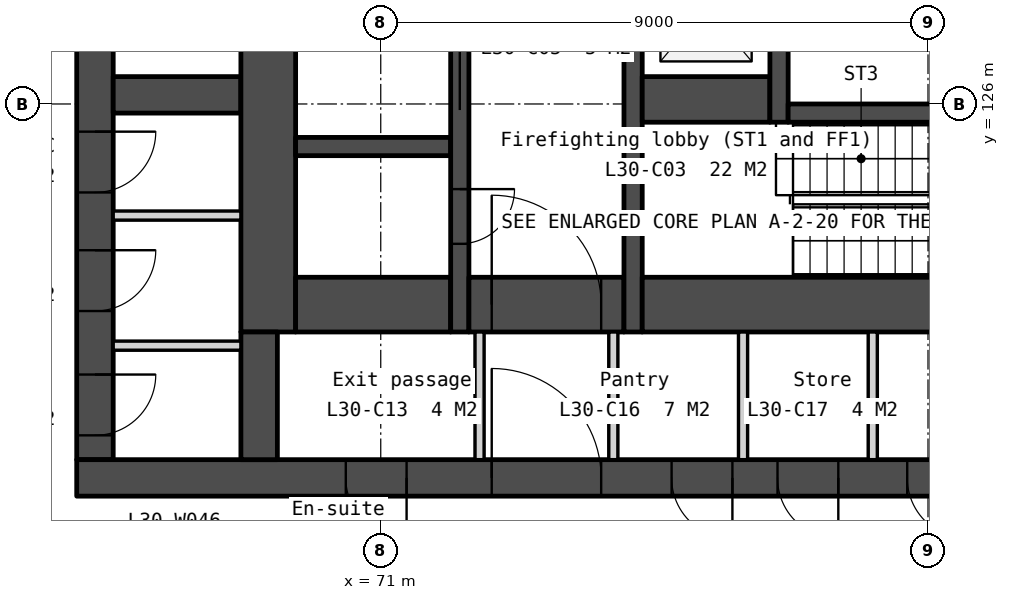
"""IFC4 building model, lengths in metres.
Left out: names, types, materials, properties, quantities, classifications, styles, units other than length and angle.
Written with IfcOpenShell. Run it as: python <this file> out.ifc"""

import sys

from ifc_helpers import new_model, si_unit, direction, frame, frame_2d, origin, place, context, subcontext, project, spatial, polyline, rectangle, outline, extrude, element, fill, save


model = new_model("IFC4")
c1 = context("Model", 3, precision=1e-05, world=origin(), true_north=direction((0.0, 1.0)))
c2 = subcontext(c1, "Body", "Model", "MODEL_VIEW")
j1 = project(units=[si_unit("LENGTHUNIT", "METRE"), si_unit("PLANEANGLEUNIT", "RADIAN")], contexts=[c1])
p1 = place(None, origin())
s1 = spatial("IfcSite", under=j1, at=p1, CompositionType="ELEMENT")
p2 = place(p1, origin())
s2 = spatial("IfcBuilding", under=s1, at=p2, CompositionType="ELEMENT")
p3 = place(p2, frame((0.0, 0.0, 120.3)))
s3 = spatial("IfcBuildingStorey", under=s2, at=p3, CompositionType="ELEMENT", Elevation=120.3)
p4 = place(p3, frame((66.3, 133.95, 0.0), z_axis=(0.0, 0.0, 1.0), x_axis=(0.0, -1.0, 0.0)))
e1 = element("IfcWall", 1, at=p4, inside=s3, PredefinedType="SOLIDWALL", context=c2, shape_type="SweptSolid", body=[
    extrude(rectangle(XDim=13.8, YDim=0.6, at=frame_2d((6.9, 0.0))), origin(), (0.0, 0.0, 1.0), 3.25),
])
p5 = place(p4, frame((0.6, 0.0, 0.0)))
e2 = element("IfcOpeningElement", 2, at=p5, cuts=e1, PredefinedType="OPENING", context=c2, shape_type="SweptSolid", body=[
    extrude(rectangle(XDim=1.1, YDim=2.1, at=frame_2d((0.55, 1.05))), frame((0.0, 0.31, 0.0), z_axis=(0.0, -1.0, 0.0), x_axis=(1.0, 0.0, 0.0)), (0.0, 0.0, 1.0), 0.62),
])
p6 = place(p4, frame((8.405, 0.0, 0.0)))
e3 = element("IfcOpeningElement", 3, at=p6, cuts=e1, PredefinedType="OPENING", context=c2, shape_type="SweptSolid", body=[
    extrude(rectangle(XDim=1.0, YDim=2.1, at=frame_2d((0.5, 1.05))), frame((0.0, 0.31, 0.0), z_axis=(0.0, -1.0, 0.0), x_axis=(1.0, 0.0, 0.0)), (0.0, 0.0, 1.0), 0.62),
])
p7 = place(p4, frame((10.355, 0.0, 0.0)))
e4 = element("IfcOpeningElement", 4, at=p7, cuts=e1, PredefinedType="OPENING", context=c2, shape_type="SweptSolid", body=[
    extrude(rectangle(XDim=1.0, YDim=2.1, at=frame_2d((0.5, 1.05))), frame((0.0, 0.31, 0.0), z_axis=(0.0, -1.0, 0.0), x_axis=(1.0, 0.0, 0.0)), (0.0, 0.0, 1.0), 0.62),
])
p8 = place(p4, frame((12.4, 0.0, 0.0)))
e5 = element("IfcOpeningElement", 5, at=p8, cuts=e1, PredefinedType="OPENING", context=c2, shape_type="SweptSolid", body=[
    extrude(rectangle(XDim=1.0, YDim=2.1, at=frame_2d((0.5, 1.05))), frame((0.0, 0.31, 0.0), z_axis=(0.0, -1.0, 0.0), x_axis=(1.0, 0.0, 0.0)), (0.0, 0.0, 1.0), 0.62),
])
p9 = place(p3, frame((66.0, 119.85, 0.0), z_axis=(0.0, 0.0, 1.0), x_axis=(1.0, 0.0, 0.0)))
e6 = element("IfcWall", 6, at=p9, inside=s3, PredefinedType="SOLIDWALL", context=c2, shape_type="SweptSolid", body=[
    extrude(rectangle(XDim=28.0, YDim=0.6, at=frame_2d((14.0, 0.0))), origin(), (0.0, 0.0, 1.0), 3.25),
])
p10 = place(p9, frame((6.825, 0.0, 0.0)))
e7 = element("IfcOpeningElement", 7, at=p10, cuts=e6, PredefinedType="OPENING", context=c2, shape_type="SweptSolid", body=[
    extrude(rectangle(XDim=1.8, YDim=2.1, at=frame_2d((0.9, 1.05))), frame((0.0, 0.31, 0.0), z_axis=(0.0, -1.0, 0.0), x_axis=(1.0, 0.0, 0.0)), (0.0, 0.0, 1.0), 0.62),
])
p11 = place(p9, frame((15.85, 0.0, 0.0)))
e8 = element("IfcOpeningElement", 8, at=p11, cuts=e6, PredefinedType="OPENING", context=c2, shape_type="SweptSolid", body=[
    extrude(rectangle(XDim=1.5, YDim=2.1, at=frame_2d((0.75, 1.05))), frame((0.0, 0.31, 0.0), z_axis=(0.0, -1.0, 0.0), x_axis=(1.0, 0.0, 0.0)), (0.0, 0.0, 1.0), 0.62),
])
p12 = place(p9, frame((19.375, 0.0, 0.0)))
e9 = element("IfcOpeningElement", 9, at=p12, cuts=e6, PredefinedType="OPENING", context=c2, shape_type="SweptSolid", body=[
    extrude(rectangle(XDim=1.8, YDim=2.1, at=frame_2d((0.9, 1.05))), frame((0.0, 0.31, 0.0), z_axis=(0.0, -1.0, 0.0), x_axis=(1.0, 0.0, 0.0)), (0.0, 0.0, 1.0), 0.62),
])
p13 = place(p9, frame((4.425, 0.0, 0.0)))
e10 = element("IfcOpeningElement", 10, at=p13, cuts=e6, PredefinedType="OPENING", context=c2, shape_type="SweptSolid", body=[
    extrude(rectangle(XDim=1.0, YDim=2.1, at=frame_2d((0.5, 1.05))), frame((0.0, 0.31, 0.0), z_axis=(0.0, -1.0, 0.0), x_axis=(1.0, 0.0, 0.0)), (0.0, 0.0, 1.0), 0.62),
])
p14 = place(p9, frame((9.783, 0.0, 0.0)))
e11 = element("IfcOpeningElement", 11, at=p14, cuts=e6, PredefinedType="OPENING", context=c2, shape_type="SweptSolid", body=[
    extrude(rectangle(XDim=1.0, YDim=2.1, at=frame_2d((0.5, 1.05))), frame((0.0, 0.31, 0.0), z_axis=(0.0, -1.0, 0.0), x_axis=(1.0, 0.0, 0.0)), (0.0, 0.0, 1.0), 0.62),
])
p15 = place(p9, frame((11.525, 0.0, 0.0)))
e12 = element("IfcOpeningElement", 12, at=p15, cuts=e6, PredefinedType="OPENING", context=c2, shape_type="SweptSolid", body=[
    extrude(rectangle(XDim=1.0, YDim=2.1, at=frame_2d((0.5, 1.05))), frame((0.0, 0.31, 0.0), z_axis=(0.0, -1.0, 0.0), x_axis=(1.0, 0.0, 0.0)), (0.0, 0.0, 1.0), 0.62),
])
p16 = place(p9, frame((13.658, 0.0, 0.0)))
e13 = element("IfcOpeningElement", 13, at=p16, cuts=e6, PredefinedType="OPENING", context=c2, shape_type="SweptSolid", body=[
    extrude(rectangle(XDim=1.0, YDim=2.1, at=frame_2d((0.5, 1.05))), frame((0.0, 0.31, 0.0), z_axis=(0.0, -1.0, 0.0), x_axis=(1.0, 0.0, 0.0)), (0.0, 0.0, 1.0), 0.62),
])
p17 = place(p9, frame((21.725, 0.0, 0.0)))
e14 = element("IfcOpeningElement", 14, at=p17, cuts=e6, PredefinedType="OPENING", context=c2, shape_type="SweptSolid", body=[
    extrude(rectangle(XDim=1.0, YDim=2.1, at=frame_2d((0.5, 1.05))), frame((0.0, 0.31, 0.0), z_axis=(0.0, -1.0, 0.0), x_axis=(1.0, 0.0, 0.0)), (0.0, 0.0, 1.0), 0.62),
])
p18 = place(p9, frame((23.425, 0.0, 0.0)))
e15 = element("IfcOpeningElement", 15, at=p18, cuts=e6, PredefinedType="OPENING", context=c2, shape_type="SweptSolid", body=[
    extrude(rectangle(XDim=1.0, YDim=2.1, at=frame_2d((0.5, 1.05))), frame((0.0, 0.31, 0.0), z_axis=(0.0, -1.0, 0.0), x_axis=(1.0, 0.0, 0.0)), (0.0, 0.0, 1.0), 0.62),
])
p19 = place(p3, frame((66.6, 126.15, 0.0), z_axis=(0.0, 0.0, 1.0), x_axis=(1.0, 0.0, 0.0)))
e16 = element("IfcWall", 16, at=p19, inside=s3, PredefinedType="SOLIDWALL", context=c2, shape_type="SweptSolid", body=[
    extrude(rectangle(XDim=2.1, YDim=0.6, at=frame_2d((1.05, 0.0))), origin(), (0.0, 0.0, 1.0), 3.25),
])
for number, where, z_axis, x_axis in (
    (17, (66.6, 124.165, 0.0), (0.0, 0.0, 1.0), (1.0, 0.0, 0.0)),
    (18, (66.6, 122.025, 0.0), (0.0, 0.0, 1.0), (1.0, 0.0, 0.0)),
):
    element("IfcWall", number, at=place(p3, frame(where, z_axis=z_axis, x_axis=x_axis)), inside=s3, PredefinedType="PARTITIONING", context=c2, shape_type="SweptSolid", body=[
        extrude(rectangle(XDim=2.1, YDim=0.15, at=frame_2d((1.05, 0.0))), origin(), (0.0, 0.0, 1.0), 3.25),
    ])
p20 = place(p3, frame((69.15, 133.95, 0.0), z_axis=(0.0, 0.0, 1.0), x_axis=(0.0, -1.0, 0.0)))
e19 = element("IfcWall", 19, at=p20, inside=s3, PredefinedType="SOLIDWALL", context=c2, shape_type="SweptSolid", body=[
    extrude(rectangle(XDim=11.7, YDim=0.9, at=frame_2d((5.85, 0.0))), origin(), (0.0, 0.0, 1.0), 3.25),
])
p21 = place(p3, frame((69.0, 122.25, 0.0), z_axis=(0.0, 0.0, 1.0), x_axis=(0.0, -1.0, 0.0)))
e20 = element("IfcWall", 20, at=p21, inside=s3, PredefinedType="SOLIDWALL", context=c2, shape_type="SweptSolid", body=[
    extrude(rectangle(XDim=2.1, YDim=0.6, at=frame_2d((1.05, 0.0))), origin(), (0.0, 0.0, 1.0), 3.25),
])
p22 = place(p3, frame((69.6, 125.3, 0.0), z_axis=(0.0, 0.0, 1.0), x_axis=(1.0, 0.0, 0.0)))
e21 = element("IfcWall", 21, at=p22, inside=s3, PredefinedType="SOLIDWALL", context=c2, shape_type="SweptSolid", body=[
    extrude(rectangle(XDim=2.55, YDim=0.3, at=frame_2d((1.275, 0.0))), origin(), (0.0, 0.0, 1.0), 3.25),
])
p23 = place(p3, frame((69.6, 122.7, 0.0), z_axis=(0.0, 0.0, 1.0), x_axis=(1.0, 0.0, 0.0)))
e22 = element("IfcWall", 22, at=p23, inside=s3, PredefinedType="SOLIDWALL", context=c2, shape_type="SweptSolid", body=[
    extrude(rectangle(XDim=2.55, YDim=0.9, at=frame_2d((1.275, 0.0))), origin(), (0.0, 0.0, 1.0), 3.25),
])
p24 = place(p3, frame((72.3, 133.95, 0.0), z_axis=(0.0, 0.0, 1.0), x_axis=(0.0, -1.0, 0.0)))
e23 = element("IfcWall", 23, at=p24, inside=s3, PredefinedType="SOLIDWALL", context=c2, shape_type="SweptSolid", body=[
    extrude(rectangle(XDim=11.7, YDim=0.3, at=frame_2d((5.85, 0.0))), origin(), (0.0, 0.0, 1.0), 3.25),
])
p25 = place(p24, frame((6.95, 0.0, 0.0)))
e24 = element("IfcOpeningElement", 24, at=p25, cuts=e23, PredefinedType="OPENING", context=c2, shape_type="SweptSolid", body=[
    extrude(rectangle(XDim=1.1, YDim=2.1, at=frame_2d((0.55, 1.05))), frame((0.0, 0.16, 0.0), z_axis=(0.0, -1.0, 0.0), x_axis=(1.0, 0.0, 0.0)), (0.0, 0.0, 1.0), 0.32),
])
p26 = place(p24, frame((9.35, 0.0, 0.0)))
e25 = element("IfcOpeningElement", 25, at=p26, cuts=e23, PredefinedType="OPENING", context=c2, shape_type="SweptSolid", body=[
    extrude(rectangle(XDim=0.9, YDim=2.1, at=frame_2d((0.45, 1.05))), frame((0.0, 0.16, 0.0), z_axis=(0.0, -1.0, 0.0), x_axis=(1.0, 0.0, 0.0)), (0.0, 0.0, 1.0), 0.32),
])
p27 = place(p24, frame((5.1, 0.0, 0.0)))
e26 = element("IfcOpeningElement", 26, at=p27, cuts=e23, PredefinedType="OPENING", context=c2, shape_type="SweptSolid", body=[
    extrude(rectangle(XDim=1.0, YDim=2.1, at=frame_2d((0.5, 1.05))), frame((0.0, 0.16, 0.0), z_axis=(0.0, -1.0, 0.0), x_axis=(1.0, 0.0, 0.0)), (0.0, 0.0, 1.0), 0.32),
])
p28 = place(p3, frame((72.45, 122.7, 0.0), z_axis=(0.0, 0.0, 1.0), x_axis=(1.0, 0.0, 0.0)))
e27 = element("IfcWall", 27, at=p28, inside=s3, PredefinedType="SOLIDWALL", context=c2, shape_type="SweptSolid", body=[
    extrude(rectangle(XDim=2.55, YDim=0.9, at=frame_2d((1.275, 0.0))), origin(), (0.0, 0.0, 1.0), 3.25),
])
p29 = place(p28, frame((0.375, 0.0, 0.0)))
e28 = element("IfcOpeningElement", 28, at=p29, cuts=e27, PredefinedType="OPENING", context=c2, shape_type="SweptSolid", body=[
    extrude(rectangle(XDim=1.8, YDim=2.1, at=frame_2d((0.9, 1.05))), frame((0.0, 0.46, 0.0), z_axis=(0.0, -1.0, 0.0), x_axis=(1.0, 0.0, 0.0)), (0.0, 0.0, 1.0), 0.92),
])
for number, where, z_axis, x_axis in (
    (29, (72.625, 122.25, 0.0), (0.0, 0.0, 1.0), (0.0, -1.0, 0.0)),
    (30, (74.825, 122.25, 0.0), (0.0, 0.0, 1.0), (0.0, -1.0, 0.0)),
):
    element("IfcWall", number, at=place(p3, frame(where, z_axis=z_axis, x_axis=x_axis)), inside=s3, PredefinedType="PARTITIONING", context=c2, shape_type="SweptSolid", body=[
        extrude(rectangle(XDim=2.1, YDim=0.15, at=frame_2d((1.05, 0.0))), origin(), (0.0, 0.0, 1.0), 3.25),
    ])
p30 = place(p3, frame((75.15, 133.95, 0.0), z_axis=(0.0, 0.0, 1.0), x_axis=(0.0, -1.0, 0.0)))
e31 = element("IfcWall", 31, at=p30, inside=s3, PredefinedType="SOLIDWALL", context=c2, shape_type="SweptSolid", body=[
    extrude(rectangle(XDim=11.7, YDim=0.3, at=frame_2d((5.85, 0.0))), origin(), (0.0, 0.0, 1.0), 3.25),
])
p31 = place(p3, frame((75.3, 126.075, 0.0), z_axis=(0.0, 0.0, 1.0), x_axis=(1.0, 0.0, 0.0)))
e32 = element("IfcWall", 32, at=p31, inside=s3, PredefinedType="SOLIDWALL", context=c2, shape_type="SweptSolid", body=[
    extrude(rectangle(XDim=2.1, YDim=0.75, at=frame_2d((1.05, 0.0))), origin(), (0.0, 0.0, 1.0), 3.25),
])
p32 = place(p3, frame((75.3, 122.7, 0.0), z_axis=(0.0, 0.0, 1.0), x_axis=(1.0, 0.0, 0.0)))
e33 = element("IfcWall", 33, at=p32, inside=s3, PredefinedType="SOLIDWALL", context=c2, shape_type="SweptSolid", body=[
    extrude(rectangle(XDim=6.2, YDim=0.9, at=frame_2d((3.1, 0.0))), origin(), (0.0, 0.0, 1.0), 3.25),
])
p33 = place(p3, frame((76.958, 122.25, 0.0), z_axis=(0.0, 0.0, 1.0), x_axis=(0.0, -1.0, 0.0)))
e34 = element("IfcWall", 34, at=p33, inside=s3, PredefinedType="PARTITIONING", context=c2, shape_type="SweptSolid", body=[
    extrude(rectangle(XDim=2.1, YDim=0.15, at=frame_2d((1.05, 0.0))), origin(), (0.0, 0.0, 1.0), 3.25),
])
p34 = place(p3, frame((77.55, 133.95, 0.0), z_axis=(0.0, 0.0, 1.0), x_axis=(0.0, -1.0, 0.0)))
e35 = element("IfcWall", 35, at=p34, inside=s3, PredefinedType="SOLIDWALL", context=c2, shape_type="SweptSolid", body=[
    extrude(rectangle(XDim=8.25, YDim=0.3, at=frame_2d((4.125, 0.0))), origin(), (0.0, 0.0, 1.0), 3.25),
])
p35 = place(p34, frame((0.6, 0.0, 0.0)))
e36 = element("IfcOpeningElement", 36, at=p35, cuts=e35, PredefinedType="OPENING", context=c2, shape_type="SweptSolid", body=[
    extrude(rectangle(XDim=1.1, YDim=2.1, at=frame_2d((0.55, 1.05))), frame((0.0, 0.16, 0.0), z_axis=(0.0, -1.0, 0.0), x_axis=(1.0, 0.0, 0.0)), (0.0, 0.0, 1.0), 0.32),
])
p36 = place(p34, frame((3.2, 0.0, 0.0)))
e37 = element("IfcOpeningElement", 37, at=p36, cuts=e35, PredefinedType="OPENING", context=c2, shape_type="SweptSolid", body=[
    extrude(rectangle(XDim=1.1, YDim=2.1, at=frame_2d((0.55, 1.05))), frame((0.0, 0.16, 0.0), z_axis=(0.0, -1.0, 0.0), x_axis=(1.0, 0.0, 0.0)), (0.0, 0.0, 1.0), 0.32),
])
p37 = place(p34, frame((5.8, 0.0, 0.0)))
e38 = element("IfcOpeningElement", 38, at=p37, cuts=e35, PredefinedType="OPENING", context=c2, shape_type="SweptSolid", body=[
    extrude(rectangle(XDim=1.1, YDim=2.1, at=frame_2d((0.55, 1.05))), frame((0.0, 0.16, 0.0), z_axis=(0.0, -1.0, 0.0), x_axis=(1.0, 0.0, 0.0)), (0.0, 0.0, 1.0), 0.32),
])
p38 = place(p3, frame((77.7, 125.85, 0.0), z_axis=(0.0, 0.0, 1.0), x_axis=(1.0, 0.0, 0.0)))
e39 = element("IfcWall", 39, at=p38, inside=s3, PredefinedType="SOLIDWALL", context=c2, shape_type="SweptSolid", body=[
    extrude(rectangle(XDim=4.6, YDim=0.3, at=frame_2d((2.3, 0.0))), origin(), (0.0, 0.0, 1.0), 3.25),
])
p39 = place(p3, frame((79.092, 122.25, 0.0), z_axis=(0.0, 0.0, 1.0), x_axis=(0.0, -1.0, 0.0)))
e40 = element("IfcWall", 40, at=p39, inside=s3, PredefinedType="PARTITIONING", context=c2, shape_type="SweptSolid", body=[
    extrude(rectangle(XDim=2.1, YDim=0.15, at=frame_2d((1.05, 0.0))), origin(), (0.0, 0.0, 1.0), 3.25),
])
p40 = place(p3, frame((56.073, 130.263, -0.15), z_axis=(0.0, 0.0, 1.0), x_axis=(0.500000478905, -0.866025127289, 0.0)))
e41 = element("IfcWall", 41, at=p40, inside=s3, PredefinedType="SOLIDWALL", context=c2, shape_type="SweptSolid", body=[
    extrude(outline(polyline([(42.643, 0.0), (42.643, 3.4), (0.0, 3.4), (0.0, 0.0), (42.643, 0.0)])), frame((0.0, 0.225, 0.0), z_axis=(0.0, -1.0, 0.0), x_axis=(1.0, 0.0, 0.0)), (0.0, 0.0, 1.0), 0.45),
])
p41 = place(p40, frame((2.814, 0.0, 1.05)))
e42 = element("IfcOpeningElement", 42, at=p41, cuts=e41, PredefinedType="OPENING", context=c2, shape_type="SweptSolid", body=[
    extrude(rectangle(XDim=1.2, YDim=1.5, at=frame_2d((0.6, 0.75))), frame((0.0, 0.235, 0.0), z_axis=(0.0, -1.0, 0.0), x_axis=(1.0, 0.0, 0.0)), (0.0, 0.0, 1.0), 0.47),
])
p42 = place(p40, frame((4.514, 0.0, 1.05)))
e43 = element("IfcOpeningElement", 43, at=p42, cuts=e41, PredefinedType="OPENING", context=c2, shape_type="SweptSolid", body=[
    extrude(rectangle(XDim=1.2, YDim=1.5, at=frame_2d((0.6, 0.75))), frame((0.0, 0.235, 0.0), z_axis=(0.0, -1.0, 0.0), x_axis=(1.0, 0.0, 0.0)), (0.0, 0.0, 1.0), 0.47),
])
p43 = place(p40, frame((11.343, 0.0, 1.05)))
e44 = element("IfcOpeningElement", 44, at=p43, cuts=e41, PredefinedType="OPENING", context=c2, shape_type="SweptSolid", body=[
    extrude(rectangle(XDim=1.2, YDim=1.5, at=frame_2d((0.6, 0.75))), frame((0.0, 0.235, 0.0), z_axis=(0.0, -1.0, 0.0), x_axis=(1.0, 0.0, 0.0)), (0.0, 0.0, 1.0), 0.47),
])
p44 = place(p40, frame((13.043, 0.0, 1.05)))
e45 = element("IfcOpeningElement", 45, at=p44, cuts=e41, PredefinedType="OPENING", context=c2, shape_type="SweptSolid", body=[
    extrude(rectangle(XDim=1.2, YDim=1.5, at=frame_2d((0.6, 0.75))), frame((0.0, 0.235, 0.0), z_axis=(0.0, -1.0, 0.0), x_axis=(1.0, 0.0, 0.0)), (0.0, 0.0, 1.0), 0.47),
])
p45 = place(p40, frame((19.872, 0.0, 1.05)))
e46 = element("IfcOpeningElement", 46, at=p45, cuts=e41, PredefinedType="OPENING", context=c2, shape_type="SweptSolid", body=[
    extrude(rectangle(XDim=1.2, YDim=1.5, at=frame_2d((0.6, 0.75))), frame((0.0, 0.235, 0.0), z_axis=(0.0, -1.0, 0.0), x_axis=(1.0, 0.0, 0.0)), (0.0, 0.0, 1.0), 0.47),
])
p46 = place(p40, frame((21.572, 0.0, 1.05)))
e47 = element("IfcOpeningElement", 47, at=p46, cuts=e41, PredefinedType="OPENING", context=c2, shape_type="SweptSolid", body=[
    extrude(rectangle(XDim=1.2, YDim=1.5, at=frame_2d((0.6, 0.75))), frame((0.0, 0.235, 0.0), z_axis=(0.0, -1.0, 0.0), x_axis=(1.0, 0.0, 0.0)), (0.0, 0.0, 1.0), 0.47),
])
p47 = place(p40, frame((28.4, 0.0, 1.05)))
e48 = element("IfcOpeningElement", 48, at=p47, cuts=e41, PredefinedType="OPENING", context=c2, shape_type="SweptSolid", body=[
    extrude(rectangle(XDim=1.2, YDim=1.5, at=frame_2d((0.6, 0.75))), frame((0.0, 0.235, 0.0), z_axis=(0.0, -1.0, 0.0), x_axis=(1.0, 0.0, 0.0)), (0.0, 0.0, 1.0), 0.47),
])
p48 = place(p40, frame((30.1, 0.0, 1.05)))
e49 = element("IfcOpeningElement", 49, at=p48, cuts=e41, PredefinedType="OPENING", context=c2, shape_type="SweptSolid", body=[
    extrude(rectangle(XDim=1.2, YDim=1.5, at=frame_2d((0.6, 0.75))), frame((0.0, 0.235, 0.0), z_axis=(0.0, -1.0, 0.0), x_axis=(1.0, 0.0, 0.0)), (0.0, 0.0, 1.0), 0.47),
])
p49 = place(p40, frame((36.929, 0.0, 1.05)))
e50 = element("IfcOpeningElement", 50, at=p49, cuts=e41, PredefinedType="OPENING", context=c2, shape_type="SweptSolid", body=[
    extrude(rectangle(XDim=1.2, YDim=1.5, at=frame_2d((0.6, 0.75))), frame((0.0, 0.235, 0.0), z_axis=(0.0, -1.0, 0.0), x_axis=(1.0, 0.0, 0.0)), (0.0, 0.0, 1.0), 0.47),
])
p50 = place(p40, frame((38.629, 0.0, 1.05)))
e51 = element("IfcOpeningElement", 51, at=p50, cuts=e41, PredefinedType="OPENING", context=c2, shape_type="SweptSolid", body=[
    extrude(rectangle(XDim=1.2, YDim=1.5, at=frame_2d((0.6, 0.75))), frame((0.0, 0.235, 0.0), z_axis=(0.0, -1.0, 0.0), x_axis=(1.0, 0.0, 0.0)), (0.0, 0.0, 1.0), 0.47),
])
p51 = place(p25, origin())
e52 = element("IfcDoor", 52, at=p51, inside=s3, OperationType="SLIDING_TO_LEFT", PredefinedType="DOOR", context=c2, shape_type="SweptSolid", body=[
    extrude(rectangle(XDim=1.1, YDim=2.1, at=frame_2d((0.55, 1.05))), frame((0.0, 0.025, 0.0), z_axis=(0.0, -1.0, 0.0), x_axis=(1.0, 0.0, 0.0)), (0.0, 0.0, 1.0), 0.05),
])
fill(e24, e52)
p52 = place(p29, origin())
e53 = element("IfcDoor", 53, at=p52, inside=s3, OperationType="DOUBLE_DOOR_DOUBLE_SWING", PredefinedType="DOOR", context=c2, shape_type="SweptSolid", body=[
    extrude(rectangle(XDim=1.8, YDim=2.1, at=frame_2d((0.9, 1.05))), frame((0.0, 0.025, 0.0), z_axis=(0.0, -1.0, 0.0), x_axis=(1.0, 0.0, 0.0)), (0.0, 0.0, 1.0), 0.05),
])
fill(e28, e53)
p53 = place(p10, origin())
e54 = element("IfcDoor", 54, at=p53, inside=s3, OperationType="DOUBLE_DOOR_DOUBLE_SWING", PredefinedType="DOOR", context=c2, shape_type="SweptSolid", body=[
    extrude(rectangle(XDim=1.8, YDim=2.1, at=frame_2d((0.9, 1.05))), frame((0.0, 0.025, 0.0), z_axis=(0.0, -1.0, 0.0), x_axis=(1.0, 0.0, 0.0)), (0.0, 0.0, 1.0), 0.05),
])
fill(e7, e54)
p54 = place(p26, origin())
e55 = element("IfcDoor", 55, at=p54, inside=s3, OperationType="SINGLE_SWING_LEFT", PredefinedType="DOOR", context=c2, shape_type="SweptSolid", body=[
    extrude(rectangle(XDim=0.9, YDim=2.1, at=frame_2d((0.45, 1.05))), frame((0.0, 0.025, 0.0), z_axis=(0.0, -1.0, 0.0), x_axis=(1.0, 0.0, 0.0)), (0.0, 0.0, 1.0), 0.05),
])
fill(e25, e55)
p55 = place(p13, origin())
e56 = element("IfcDoor", 56, at=p55, inside=s3, OperationType="SINGLE_SWING_RIGHT", PredefinedType="DOOR", context=c2, shape_type="SweptSolid", body=[
    extrude(rectangle(XDim=1.0, YDim=2.1, at=frame_2d((0.5, 1.05))), frame((0.0, 0.025, 0.0), z_axis=(0.0, -1.0, 0.0), x_axis=(1.0, 0.0, 0.0)), (0.0, 0.0, 1.0), 0.05),
])
fill(e10, e56)
p56 = place(p14, origin())
e57 = element("IfcDoor", 57, at=p56, inside=s3, OperationType="SINGLE_SWING_RIGHT", PredefinedType="DOOR", context=c2, shape_type="SweptSolid", body=[
    extrude(rectangle(XDim=1.0, YDim=2.1, at=frame_2d((0.5, 1.05))), frame((0.0, 0.025, 0.0), z_axis=(0.0, -1.0, 0.0), x_axis=(1.0, 0.0, 0.0)), (0.0, 0.0, 1.0), 0.05),
])
fill(e11, e57)
p57 = place(p15, origin())
e58 = element("IfcDoor", 58, at=p57, inside=s3, OperationType="SINGLE_SWING_RIGHT", PredefinedType="DOOR", context=c2, shape_type="SweptSolid", body=[
    extrude(rectangle(XDim=1.0, YDim=2.1, at=frame_2d((0.5, 1.05))), frame((0.0, 0.025, 0.0), z_axis=(0.0, -1.0, 0.0), x_axis=(1.0, 0.0, 0.0)), (0.0, 0.0, 1.0), 0.05),
])
fill(e12, e58)
p58 = place(p16, origin())
e59 = element("IfcDoor", 59, at=p58, inside=s3, OperationType="SINGLE_SWING_RIGHT", PredefinedType="DOOR", context=c2, shape_type="SweptSolid", body=[
    extrude(rectangle(XDim=1.0, YDim=2.1, at=frame_2d((0.5, 1.05))), frame((0.0, 0.025, 0.0), z_axis=(0.0, -1.0, 0.0), x_axis=(1.0, 0.0, 0.0)), (0.0, 0.0, 1.0), 0.05),
])
fill(e13, e59)
p59 = place(p6, origin())
e60 = element("IfcDoor", 60, at=p59, inside=s3, OperationType="SINGLE_SWING_LEFT", PredefinedType="DOOR", context=c2, shape_type="SweptSolid", body=[
    extrude(rectangle(XDim=1.0, YDim=2.1, at=frame_2d((0.5, 1.05))), frame((0.0, 0.025, 0.0), z_axis=(0.0, -1.0, 0.0), x_axis=(1.0, 0.0, 0.0)), (0.0, 0.0, 1.0), 0.05),
])
fill(e3, e60)
p60 = place(p7, origin())
e61 = element("IfcDoor", 61, at=p60, inside=s3, OperationType="SINGLE_SWING_LEFT", PredefinedType="DOOR", context=c2, shape_type="SweptSolid", body=[
    extrude(rectangle(XDim=1.0, YDim=2.1, at=frame_2d((0.5, 1.05))), frame((0.0, 0.025, 0.0), z_axis=(0.0, -1.0, 0.0), x_axis=(1.0, 0.0, 0.0)), (0.0, 0.0, 1.0), 0.05),
])
fill(e4, e61)
p61 = place(p8, origin())
e62 = element("IfcDoor", 62, at=p61, inside=s3, OperationType="SINGLE_SWING_LEFT", PredefinedType="DOOR", context=c2, shape_type="SweptSolid", body=[
    extrude(rectangle(XDim=1.0, YDim=2.1, at=frame_2d((0.5, 1.05))), frame((0.0, 0.025, 0.0), z_axis=(0.0, -1.0, 0.0), x_axis=(1.0, 0.0, 0.0)), (0.0, 0.0, 1.0), 0.05),
])
fill(e5, e62)
save(model, sys.argv[1])
